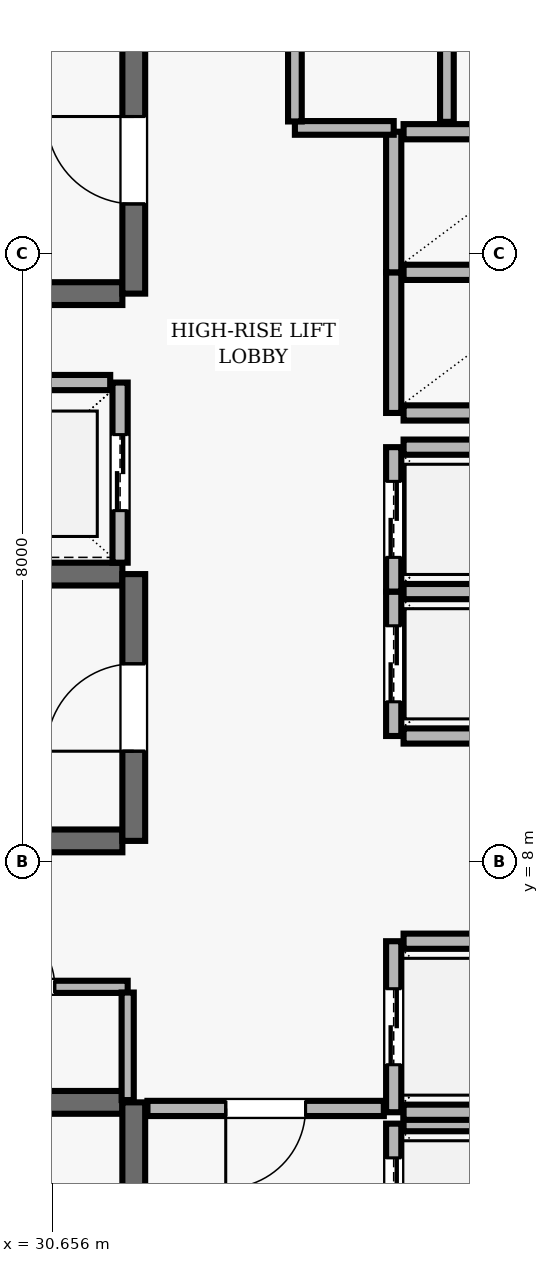
"""IFC4 building model, lengths in metres.
Left out: names, types, materials, properties, quantities, classifications, styles, units other than length and angle.
Written with IfcOpenShell. Run it as: python <this file> out.ifc"""

import sys

from ifc_helpers import new_model, si_unit, direction, frame, frame_2d, origin, place, context, subcontext, project, spatial, rectangle, extrude, element, fill, save


model = new_model("IFC4")
c1 = context("Model", 3, precision=1e-05, world=origin(), true_north=direction((0.0, 1.0)))
c2 = subcontext(c1, "Body", "Model", "MODEL_VIEW")
j1 = project(units=[si_unit("LENGTHUNIT", "METRE"), si_unit("PLANEANGLEUNIT", "RADIAN")], contexts=[c1])
p1 = place(None, origin())
s1 = spatial("IfcSite", under=j1, at=p1, CompositionType="ELEMENT")
p2 = place(p1, origin())
s2 = spatial("IfcBuilding", under=s1, at=p2, CompositionType="ELEMENT")
p3 = place(p2, frame((0.0, 0.0, 230.4)))
s3 = spatial("IfcBuildingStorey", under=s2, at=p3, CompositionType="ELEMENT", Elevation=230.4)
p4 = place(p3, frame((31.58, 4.83, 0.0), z_axis=(0.0, 0.0, 1.0), x_axis=(-1.0, 0.0, 0.0)))
e1 = element("IfcWall", 1, at=p4, inside=s3, PredefinedType="SHEAR", context=c2, shape_type="SweptSolid", body=[
    extrude(rectangle(XDim=8.36, YDim=0.3, at=frame_2d((4.18, 0.0))), origin(), (0.0, 0.0, 1.0), 3.69),
])
p5 = place(p3, frame((31.73, 0.96, 0.0), z_axis=(0.0, 0.0, 1.0), x_axis=(0.0, 1.0, 0.0)))
e2 = element("IfcWall", 2, at=p5, inside=s3, PredefinedType="SHEAR", context=c2, shape_type="SweptSolid", body=[
    extrude(rectangle(XDim=3.87, YDim=0.3, at=frame_2d((1.935, 0.0))), origin(), (0.0, 0.0, 1.0), 3.69),
])
p6 = place(p5, frame((1.54, 0.0, 0.0)))
e3 = element("IfcOpeningElement", 3, at=p6, cuts=e2, PredefinedType="OPENING", context=c2, shape_type="SweptSolid", body=[
    extrude(rectangle(XDim=1.15, YDim=2.15, at=frame_2d((0.575, 1.075))), frame((0.0, 0.16, 0.0), z_axis=(0.0, -1.0, 0.0), x_axis=(1.0, 0.0, 0.0)), (0.0, 0.0, 1.0), 0.32),
])
p7 = place(p3, frame((23.22, 15.47, 0.0), z_axis=(0.0, 0.0, 1.0), x_axis=(1.0, 0.0, 0.0)))
e4 = element("IfcWall", 4, at=p7, inside=s3, PredefinedType="SHEAR", context=c2, shape_type="SweptSolid", body=[
    extrude(rectangle(XDim=8.36, YDim=0.3, at=frame_2d((4.18, 0.0))), origin(), (0.0, 0.0, 1.0), 3.69),
])
p8 = place(p3, frame((31.73, 15.47, 0.0), z_axis=(0.0, 0.0, 1.0), x_axis=(0.0, 1.0, 0.0)))
e5 = element("IfcWall", 5, at=p8, inside=s3, PredefinedType="SHEAR", context=c2, shape_type="SweptSolid", body=[
    extrude(rectangle(XDim=3.51, YDim=0.3, at=frame_2d((1.755, 0.0))), origin(), (0.0, 0.0, 1.0), 3.69),
])
p9 = place(p8, frame((1.18, 0.0, 0.0)))
e6 = element("IfcOpeningElement", 6, at=p9, cuts=e5, PredefinedType="OPENING", context=c2, shape_type="SweptSolid", body=[
    extrude(rectangle(XDim=1.15, YDim=2.15, at=frame_2d((0.575, 1.075))), frame((0.0, 0.16, 0.0), z_axis=(0.0, -1.0, 0.0), x_axis=(1.0, 0.0, 0.0)), (0.0, 0.0, 1.0), 0.32),
])
for number, where, z_axis, x_axis in (
    (7, (31.58, 11.78, 0.0), (0.0, 0.0, 1.0), (-1.0, 0.0, 0.0)),
    (8, (23.22, 8.27, 0.0), (0.0, 0.0, 1.0), (1.0, 0.0, 0.0)),
):
    element("IfcWall", number, at=place(p3, frame(where, z_axis=z_axis, x_axis=x_axis)), inside=s3, PredefinedType="SHEAR", context=c2, shape_type="SweptSolid", body=[
        extrude(rectangle(XDim=8.36, YDim=0.3, at=frame_2d((4.18, 0.0))), origin(), (0.0, 0.0, 1.0), 3.69),
    ])
p10 = place(p3, frame((31.73, 8.27, 0.0), z_axis=(0.0, 0.0, 1.0), x_axis=(0.0, 1.0, 0.0)))
e9 = element("IfcWall", 9, at=p10, inside=s3, PredefinedType="SHEAR", context=c2, shape_type="SweptSolid", body=[
    extrude(rectangle(XDim=3.51, YDim=0.3, at=frame_2d((1.755, 0.0))), origin(), (0.0, 0.0, 1.0), 3.69),
])
p11 = place(p10, frame((1.18, 0.0, 0.0)))
e10 = element("IfcOpeningElement", 10, at=p11, cuts=e9, PredefinedType="OPENING", context=c2, shape_type="SweptSolid", body=[
    extrude(rectangle(XDim=1.15, YDim=2.15, at=frame_2d((0.575, 1.075))), frame((0.0, 0.16, 0.0), z_axis=(0.0, -1.0, 0.0), x_axis=(1.0, 0.0, 0.0)), (0.0, 0.0, 1.0), 0.32),
])
p12 = place(p3, frame((35.15, 4.55, 0.0), z_axis=(0.0, 0.0, 1.0), x_axis=(0.0, -1.0, 0.0)))
e11 = element("IfcWall", 11, at=p12, inside=s3, PredefinedType="SOLIDWALL", context=c2, shape_type="SweptSolid", body=[
    extrude(rectangle(XDim=2.1, YDim=0.2, at=frame_2d((1.05, 0.0))), origin(), (0.0, 0.0, 1.0), 3.69),
])
p13 = place(p12, frame((0.45, 0.0, 0.0)))
e12 = element("IfcOpeningElement", 12, at=p13, cuts=e11, PredefinedType="OPENING", context=c2, shape_type="SweptSolid", body=[
    extrude(rectangle(XDim=1.2, YDim=2.15, at=frame_2d((0.6, 1.075))), frame((0.0, 0.11, 0.0), z_axis=(0.0, -1.0, 0.0), x_axis=(1.0, 0.0, 0.0)), (0.0, 0.0, 1.0), 0.22),
])
p14 = place(p3, frame((37.42, 4.55, 0.0), z_axis=(0.0, 0.0, 1.0), x_axis=(-1.0, 0.0, 0.0)))
e13 = element("IfcWall", 13, at=p14, inside=s3, PredefinedType="SOLIDWALL", context=c2, shape_type="SweptSolid", body=[
    extrude(rectangle(XDim=2.14, YDim=0.2, at=frame_2d((1.07, 0.0))), origin(), (0.0, 0.0, 1.0), 3.69),
])
p15 = place(p3, frame((35.15, 6.95, 0.0), z_axis=(0.0, 0.0, 1.0), x_axis=(0.0, -1.0, 0.0)))
e14 = element("IfcWall", 14, at=p15, inside=s3, PredefinedType="SOLIDWALL", context=c2, shape_type="SweptSolid", body=[
    extrude(rectangle(XDim=2.25, YDim=0.2, at=frame_2d((1.125, 0.0))), origin(), (0.0, 0.0, 1.0), 3.69),
])
p16 = place(p15, frame((0.625, 0.0, 0.0)))
e15 = element("IfcOpeningElement", 15, at=p16, cuts=e14, PredefinedType="OPENING", context=c2, shape_type="SweptSolid", body=[
    extrude(rectangle(XDim=1.0, YDim=2.1, at=frame_2d((0.5, 1.05))), frame((0.0, 0.11, 0.0), z_axis=(0.0, -1.0, 0.0), x_axis=(1.0, 0.0, 0.0)), (0.0, 0.0, 1.0), 0.22),
])
for number, where, z_axis, x_axis in (
    (16, (35.28, 4.7, 0.0), (0.0, 0.0, 1.0), (1.0, 0.0, 0.0)),
    (17, (37.42, 6.95, 0.0), (0.0, 0.0, 1.0), (-1.0, 0.0, 0.0)),
):
    element("IfcWall", number, at=place(p3, frame(where, z_axis=z_axis, x_axis=x_axis)), inside=s3, PredefinedType="SOLIDWALL", context=c2, shape_type="SweptSolid", body=[
        extrude(rectangle(XDim=2.14, YDim=0.2, at=frame_2d((1.07, 0.0))), origin(), (0.0, 0.0, 1.0), 3.69),
    ])
p17 = place(p3, frame((35.15, 11.55, 0.0), z_axis=(0.0, 0.0, 1.0), x_axis=(0.0, -1.0, 0.0)))
e18 = element("IfcWall", 18, at=p17, inside=s3, PredefinedType="SOLIDWALL", context=c2, shape_type="SweptSolid", body=[
    extrude(rectangle(XDim=1.9, YDim=0.2, at=frame_2d((0.95, 0.0))), origin(), (0.0, 0.0, 1.0), 3.69),
])
p18 = place(p17, frame((0.45, 0.0, 0.0)))
e19 = element("IfcOpeningElement", 19, at=p18, cuts=e18, PredefinedType="OPENING", context=c2, shape_type="SweptSolid", body=[
    extrude(rectangle(XDim=1.0, YDim=2.1, at=frame_2d((0.5, 1.05))), frame((0.0, 0.11, 0.0), z_axis=(0.0, -1.0, 0.0), x_axis=(1.0, 0.0, 0.0)), (0.0, 0.0, 1.0), 0.22),
])
for number, where, z_axis, x_axis in (
    (20, (35.28, 9.65, 0.0), (0.0, 0.0, 1.0), (1.0, 0.0, 0.0)),
    (21, (37.42, 11.55, 0.0), (0.0, 0.0, 1.0), (-1.0, 0.0, 0.0)),
):
    element("IfcWall", number, at=place(p3, frame(where, z_axis=z_axis, x_axis=x_axis)), inside=s3, PredefinedType="SOLIDWALL", context=c2, shape_type="SweptSolid", body=[
        extrude(rectangle(XDim=2.14, YDim=0.2, at=frame_2d((1.07, 0.0))), origin(), (0.0, 0.0, 1.0), 3.69),
    ])
p19 = place(p3, frame((35.15, 13.45, 0.0), z_axis=(0.0, 0.0, 1.0), x_axis=(0.0, -1.0, 0.0)))
e22 = element("IfcWall", 22, at=p19, inside=s3, PredefinedType="SOLIDWALL", context=c2, shape_type="SweptSolid", body=[
    extrude(rectangle(XDim=1.9, YDim=0.2, at=frame_2d((0.95, 0.0))), origin(), (0.0, 0.0, 1.0), 3.69),
])
p20 = place(p19, frame((0.45, 0.0, 0.0)))
e23 = element("IfcOpeningElement", 23, at=p20, cuts=e22, PredefinedType="OPENING", context=c2, shape_type="SweptSolid", body=[
    extrude(rectangle(XDim=1.0, YDim=2.1, at=frame_2d((0.5, 1.05))), frame((0.0, 0.11, 0.0), z_axis=(0.0, -1.0, 0.0), x_axis=(1.0, 0.0, 0.0)), (0.0, 0.0, 1.0), 0.22),
])
p21 = place(p3, frame((37.42, 13.45, 0.0), z_axis=(0.0, 0.0, 1.0), x_axis=(-1.0, 0.0, 0.0)))
e24 = element("IfcWall", 24, at=p21, inside=s3, PredefinedType="SOLIDWALL", context=c2, shape_type="SweptSolid", body=[
    extrude(rectangle(XDim=2.14, YDim=0.2, at=frame_2d((1.07, 0.0))), origin(), (0.0, 0.0, 1.0), 3.69),
])
p22 = place(p3, frame((31.55, 11.93, 0.0), z_axis=(0.0, 0.0, 1.0), x_axis=(0.0, 1.0, 0.0)))
e25 = element("IfcWall", 25, at=p22, inside=s3, PredefinedType="SOLIDWALL", context=c2, shape_type="SweptSolid", body=[
    extrude(rectangle(XDim=2.37, YDim=0.2, at=frame_2d((1.185, 0.0))), origin(), (0.0, 0.0, 1.0), 3.69),
])
p23 = place(p22, frame((0.685, 0.0, 0.0)))
e26 = element("IfcOpeningElement", 26, at=p23, cuts=e25, PredefinedType="OPENING", context=c2, shape_type="SweptSolid", body=[
    extrude(rectangle(XDim=1.0, YDim=2.1, at=frame_2d((0.5, 1.05))), frame((0.0, 0.11, 0.0), z_axis=(0.0, -1.0, 0.0), x_axis=(1.0, 0.0, 0.0)), (0.0, 0.0, 1.0), 0.22),
])
p24 = place(p3, frame((31.42, 14.3, 0.0), z_axis=(0.0, 0.0, 1.0), x_axis=(-1.0, 0.0, 0.0)))
e27 = element("IfcWall", 27, at=p24, inside=s3, PredefinedType="SOLIDWALL", context=c2, shape_type="SweptSolid", body=[
    extrude(rectangle(XDim=2.44, YDim=0.2, at=frame_2d((1.22, 0.0))), origin(), (0.0, 0.0, 1.0), 3.69),
])
p25 = place(p3, frame((35.15, 15.75, 0.0), z_axis=(0.0, 0.0, 1.0), x_axis=(0.0, -1.0, 0.0)))
e28 = element("IfcWall", 28, at=p25, inside=s3, PredefinedType="SOLIDWALL", context=c2, shape_type="SweptSolid", body=[
    extrude(rectangle(XDim=1.85, YDim=0.2, at=frame_2d((0.925, 0.0))), origin(), (0.0, 0.0, 1.0), 3.69),
])
for number, where, z_axis, x_axis in (
    (29, (35.28, 13.9, 0.0), (0.0, 0.0, 1.0), (1.0, 0.0, 0.0)),
    (30, (37.42, 15.75, 0.0), (0.0, 0.0, 1.0), (-1.0, 0.0, 0.0)),
):
    element("IfcWall", number, at=place(p3, frame(where, z_axis=z_axis, x_axis=x_axis)), inside=s3, PredefinedType="SOLIDWALL", context=c2, shape_type="SweptSolid", body=[
        extrude(rectangle(XDim=2.14, YDim=0.2, at=frame_2d((1.07, 0.0))), origin(), (0.0, 0.0, 1.0), 3.69),
    ])
p26 = place(p3, frame((35.15, 17.6, 0.0), z_axis=(0.0, 0.0, 1.0), x_axis=(0.0, -1.0, 0.0)))
e31 = element("IfcWall", 31, at=p26, inside=s3, PredefinedType="SOLIDWALL", context=c2, shape_type="SweptSolid", body=[
    extrude(rectangle(XDim=1.85, YDim=0.2, at=frame_2d((0.925, 0.0))), origin(), (0.0, 0.0, 1.0), 3.69),
])
p27 = place(p3, frame((37.42, 17.6, 0.0), z_axis=(0.0, 0.0, 1.0), x_axis=(-1.0, 0.0, 0.0)))
e32 = element("IfcWall", 32, at=p27, inside=s3, PredefinedType="SOLIDWALL", context=c2, shape_type="SweptSolid", body=[
    extrude(rectangle(XDim=2.14, YDim=0.2, at=frame_2d((1.07, 0.0))), origin(), (0.0, 0.0, 1.0), 3.69),
])
p28 = place(p3, frame((28.85, 6.35, 0.0), z_axis=(0.0, 0.0, 1.0), x_axis=(1.0, 0.0, 0.0)))
e33 = element("IfcWall", 33, at=p28, inside=s3, PredefinedType="PARTITIONING", context=c2, shape_type="SweptSolid", body=[
    extrude(rectangle(XDim=2.8, YDim=0.16, at=frame_2d((1.4, 0.0))), origin(), (0.0, 0.0, 1.0), 3.69),
])
p29 = place(p28, frame((0.96, 0.0, 0.0)))
e34 = element("IfcOpeningElement", 34, at=p29, cuts=e33, PredefinedType="OPENING", context=c2, shape_type="SweptSolid", body=[
    extrude(rectangle(XDim=0.88, YDim=2.1, at=frame_2d((0.44, 1.05))), frame((0.0, 0.09, 0.0), z_axis=(0.0, -1.0, 0.0), x_axis=(1.0, 0.0, 0.0)), (0.0, 0.0, 1.0), 0.18),
])
p30 = place(p3, frame((33.85, 17.65, 0.0), z_axis=(0.0, 0.0, 1.0), x_axis=(1.0, 0.0, 0.0)))
e35 = element("IfcWall", 35, at=p30, inside=s3, PredefinedType="PARTITIONING", context=c2, shape_type="SweptSolid", body=[
    extrude(rectangle(XDim=1.3, YDim=0.18, at=frame_2d((0.65, 0.0))), origin(), (0.0, 0.0, 1.0), 3.69),
])
p31 = place(p3, frame((35.02, 4.75, 0.0), z_axis=(0.0, 0.0, 1.0), x_axis=(-1.0, 0.0, 0.0)))
e36 = element("IfcWall", 36, at=p31, inside=s3, PredefinedType="SOLIDWALL", context=c2, shape_type="SweptSolid", body=[
    extrude(rectangle(XDim=3.11, YDim=0.2, at=frame_2d((1.555, 0.0))), origin(), (0.0, 0.0, 1.0), 3.69),
])
p32 = place(p31, frame((1.03, 0.0, 0.0)))
e37 = element("IfcOpeningElement", 37, at=p32, cuts=e36, PredefinedType="OPENING", context=c2, shape_type="SweptSolid", body=[
    extrude(rectangle(XDim=1.05, YDim=2.15, at=frame_2d((0.525, 1.075))), frame((0.0, 0.11, 0.0), z_axis=(0.0, -1.0, 0.0), x_axis=(1.0, 0.0, 0.0)), (0.0, 0.0, 1.0), 0.22),
])
p33 = place(p3, frame((31.65, 4.86, 0.0), z_axis=(0.0, 0.0, 1.0), x_axis=(0.0, 1.0, 0.0)))
e38 = element("IfcWall", 38, at=p33, inside=s3, PredefinedType="PARTITIONING", context=c2, shape_type="SweptSolid", body=[
    extrude(rectangle(XDim=1.415, YDim=0.16, at=frame_2d((0.708, 0.0))), origin(), (0.0, 0.0, 1.0), 3.69),
])
p34 = place(p3, frame((33.85, 17.735, 0.0), z_axis=(0.0, 0.0, 1.0), x_axis=(0.0, 1.0, 0.0)))
e39 = element("IfcWall", 39, at=p34, inside=s3, PredefinedType="PARTITIONING", context=c2, shape_type="SweptSolid", body=[
    extrude(rectangle(XDim=6.03, YDim=0.18, at=frame_2d((3.015, 0.0))), origin(), (0.0, 0.0, 1.0), 3.69),
])
p35 = place(p34, frame((2.54, 0.0, 0.0)))
e40 = element("IfcOpeningElement", 40, at=p35, cuts=e39, PredefinedType="OPENING", context=c2, shape_type="SweptSolid", body=[
    extrude(rectangle(XDim=0.95, YDim=2.1, at=frame_2d((0.475, 1.05))), frame((0.0, 0.1, 0.0), z_axis=(0.0, -1.0, 0.0), x_axis=(1.0, 0.0, 0.0)), (0.0, 0.0, 1.0), 0.2),
])
p36 = place(p3, frame((35.85, 17.73, 0.0), z_axis=(0.0, 0.0, 1.0), x_axis=(0.0, 1.0, 0.0)))
e41 = element("IfcWall", 41, at=p36, inside=s3, PredefinedType="PARTITIONING", context=c2, shape_type="SweptSolid", body=[
    extrude(rectangle(XDim=3.412, YDim=0.18, at=frame_2d((1.706, 0.0))), origin(), (0.0, 0.0, 1.0), 3.69),
])
p37 = place(p36, frame((1.256, 0.0, 0.0)))
e42 = element("IfcOpeningElement", 42, at=p37, cuts=e41, PredefinedType="OPENING", context=c2, shape_type="SweptSolid", body=[
    extrude(rectangle(XDim=0.9, YDim=2.1, at=frame_2d((0.45, 1.05))), frame((0.0, 0.1, 0.0), z_axis=(0.0, -1.0, 0.0), x_axis=(1.0, 0.0, 0.0)), (0.0, 0.0, 1.0), 0.2),
])
p38 = place(p9, origin())
e43 = element("IfcDoor", 43, at=p38, inside=s3, OperationType="SINGLE_SWING_RIGHT", PredefinedType="DOOR", context=c2, shape_type="SweptSolid", body=[
    extrude(rectangle(XDim=1.15, YDim=2.15, at=frame_2d((0.575, 1.075))), frame((0.0, 0.025, 0.0), z_axis=(0.0, -1.0, 0.0), x_axis=(1.0, 0.0, 0.0)), (0.0, 0.0, 1.0), 0.05),
])
fill(e6, e43)
p39 = place(p11, origin())
e44 = element("IfcDoor", 44, at=p39, inside=s3, OperationType="SINGLE_SWING_LEFT", PredefinedType="DOOR", context=c2, shape_type="SweptSolid", body=[
    extrude(rectangle(XDim=1.15, YDim=2.15, at=frame_2d((0.575, 1.075))), frame((0.0, 0.025, 0.0), z_axis=(0.0, -1.0, 0.0), x_axis=(1.0, 0.0, 0.0)), (0.0, 0.0, 1.0), 0.05),
])
fill(e10, e44)
p40 = place(p13, origin())
e45 = element("IfcDoor", 45, at=p40, inside=s3, OperationType="DOUBLE_DOOR_SLIDING", PredefinedType="DOOR", context=c2, shape_type="SweptSolid", body=[
    extrude(rectangle(XDim=1.2, YDim=2.15, at=frame_2d((0.6, 1.075))), frame((0.0, 0.025, 0.0), z_axis=(0.0, -1.0, 0.0), x_axis=(1.0, 0.0, 0.0)), (0.0, 0.0, 1.0), 0.05),
])
fill(e12, e45)
p41 = place(p16, origin())
e46 = element("IfcDoor", 46, at=p41, inside=s3, OperationType="DOUBLE_DOOR_SLIDING", PredefinedType="DOOR", context=c2, shape_type="SweptSolid", body=[
    extrude(rectangle(XDim=1.0, YDim=2.1, at=frame_2d((0.5, 1.05))), frame((0.0, 0.025, 0.0), z_axis=(0.0, -1.0, 0.0), x_axis=(1.0, 0.0, 0.0)), (0.0, 0.0, 1.0), 0.05),
])
fill(e15, e46)
p42 = place(p18, origin())
e47 = element("IfcDoor", 47, at=p42, inside=s3, OperationType="DOUBLE_DOOR_SLIDING", PredefinedType="DOOR", context=c2, shape_type="SweptSolid", body=[
    extrude(rectangle(XDim=1.0, YDim=2.1, at=frame_2d((0.5, 1.05))), frame((0.0, 0.025, 0.0), z_axis=(0.0, -1.0, 0.0), x_axis=(1.0, 0.0, 0.0)), (0.0, 0.0, 1.0), 0.05),
])
fill(e19, e47)
p43 = place(p20, origin())
e48 = element("IfcDoor", 48, at=p43, inside=s3, OperationType="DOUBLE_DOOR_SLIDING", PredefinedType="DOOR", context=c2, shape_type="SweptSolid", body=[
    extrude(rectangle(XDim=1.0, YDim=2.1, at=frame_2d((0.5, 1.05))), frame((0.0, 0.025, 0.0), z_axis=(0.0, -1.0, 0.0), x_axis=(1.0, 0.0, 0.0)), (0.0, 0.0, 1.0), 0.05),
])
fill(e23, e48)
p44 = place(p23, origin())
e49 = element("IfcDoor", 49, at=p44, inside=s3, OperationType="DOUBLE_DOOR_SLIDING", PredefinedType="DOOR", context=c2, shape_type="SweptSolid", body=[
    extrude(rectangle(XDim=1.0, YDim=2.1, at=frame_2d((0.5, 1.05))), frame((0.0, 0.025, 0.0), z_axis=(0.0, -1.0, 0.0), x_axis=(1.0, 0.0, 0.0)), (0.0, 0.0, 1.0), 0.05),
])
fill(e26, e49)
p45 = place(p32, origin())
e50 = element("IfcDoor", 50, at=p45, inside=s3, OperationType="SINGLE_SWING_RIGHT", PredefinedType="DOOR", context=c2, shape_type="SweptSolid", body=[
    extrude(rectangle(XDim=1.05, YDim=2.15, at=frame_2d((0.525, 1.075))), frame((0.0, 0.025, 0.0), z_axis=(0.0, -1.0, 0.0), x_axis=(1.0, 0.0, 0.0)), (0.0, 0.0, 1.0), 0.05),
])
fill(e37, e50)
p46 = place(p29, origin())
e51 = element("IfcDoor", 51, at=p46, inside=s3, OperationType="SINGLE_SWING_LEFT", PredefinedType="DOOR", context=c2, shape_type="SweptSolid", body=[
    extrude(rectangle(XDim=0.88, YDim=2.1, at=frame_2d((0.44, 1.05))), frame((0.0, 0.025, 0.0), z_axis=(0.0, -1.0, 0.0), x_axis=(1.0, 0.0, 0.0)), (0.0, 0.0, 1.0), 0.05),
])
fill(e34, e51)
save(model, sys.argv[1])
